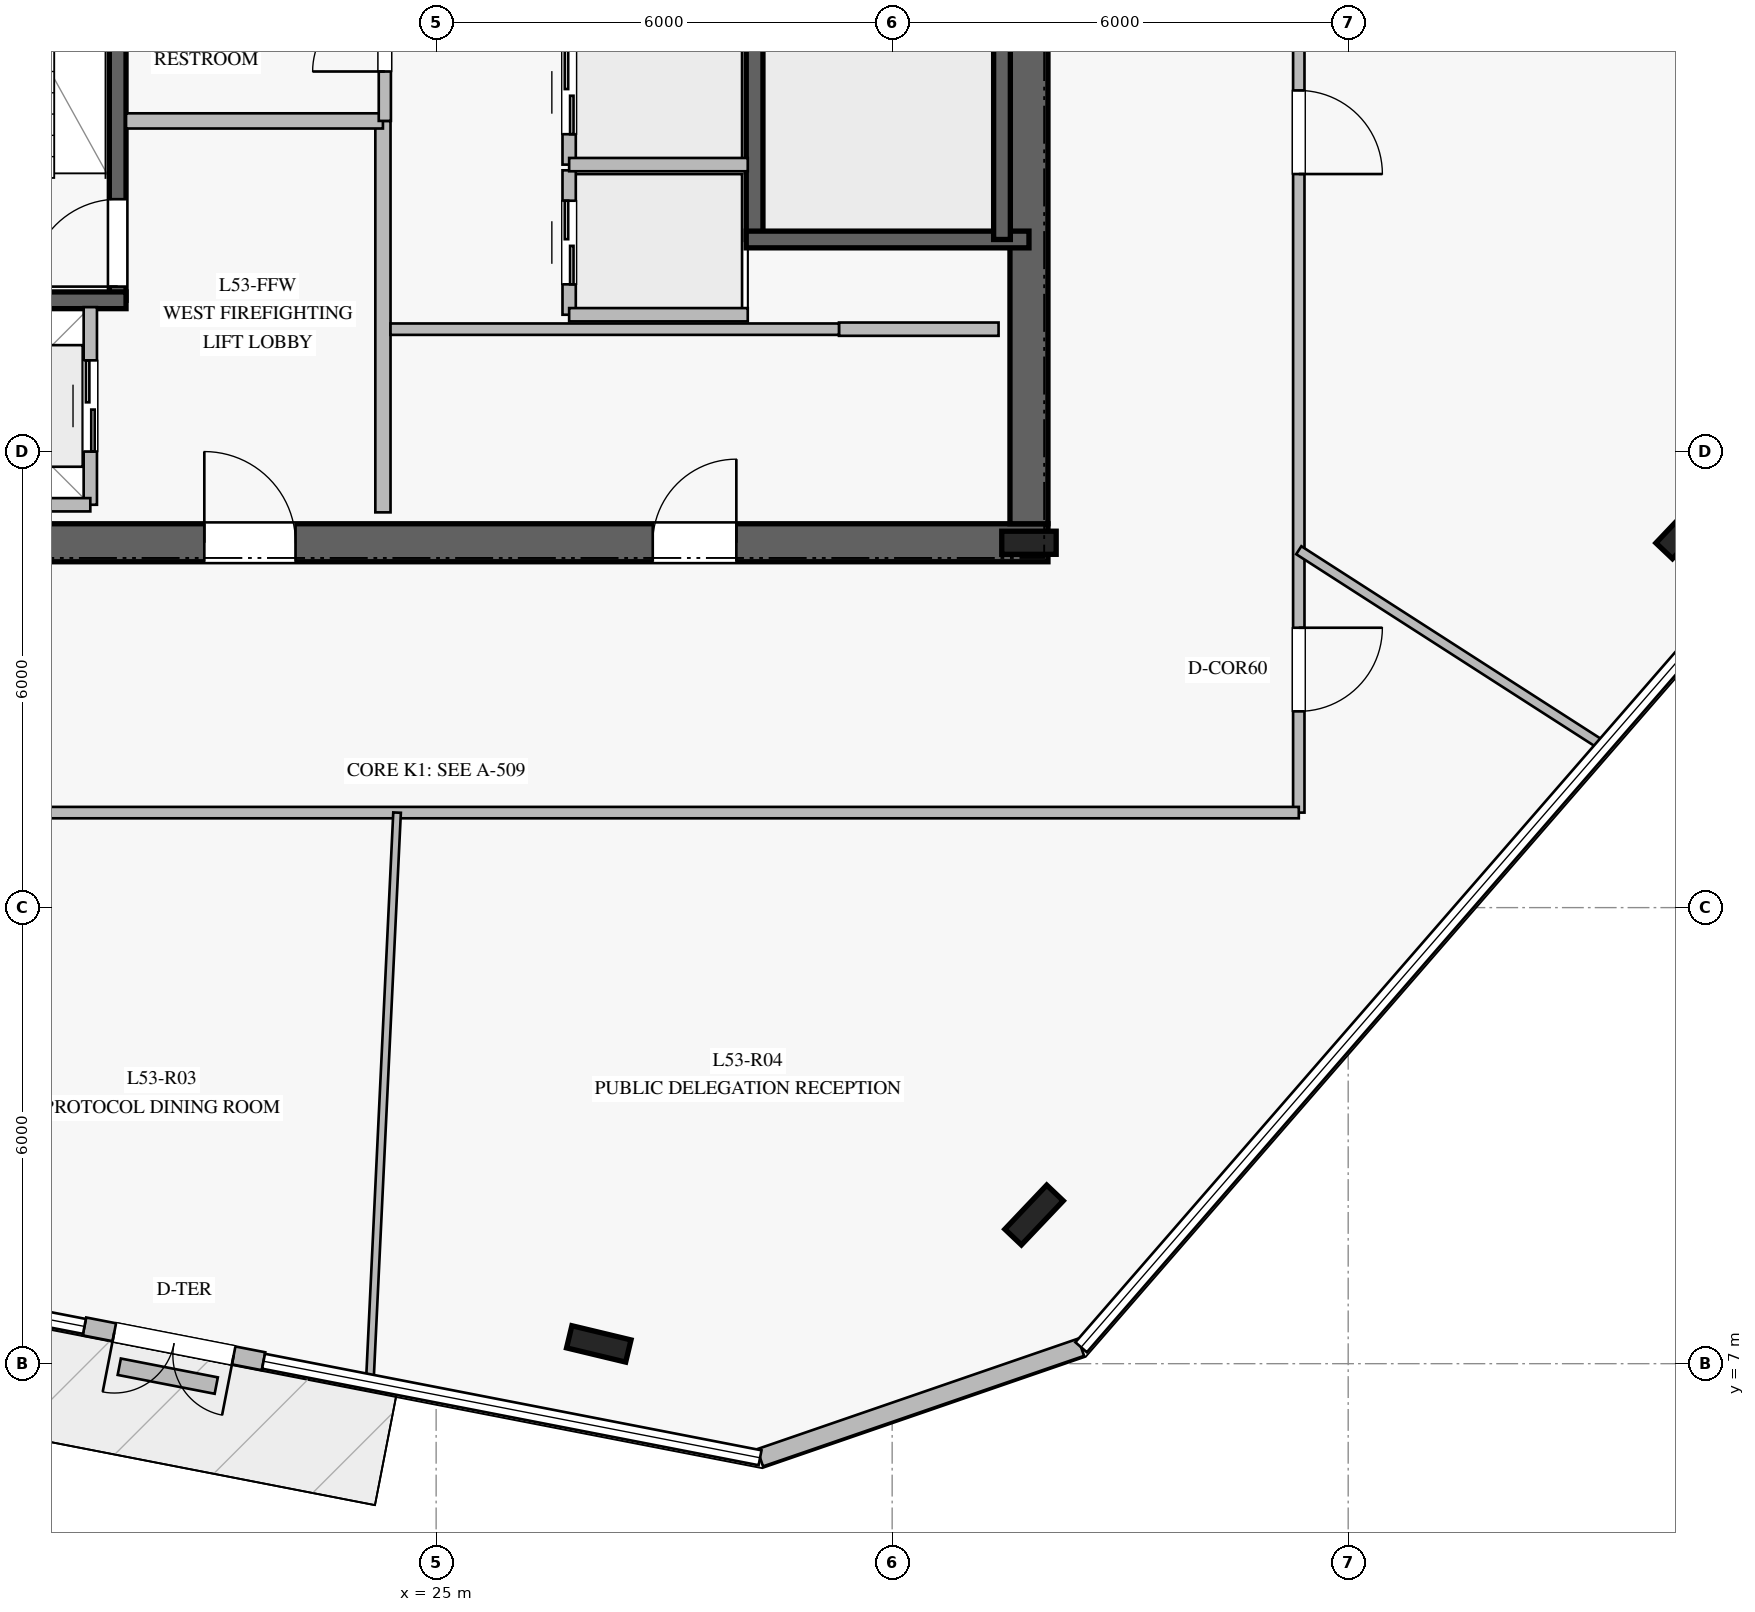
"""IFC4 building model, lengths in metres.
Left out: names, types, materials, properties, quantities, classifications, styles, units other than length and angle.
Written with IfcOpenShell. Run it as: python <this file> out.ifc"""

import sys

from ifc_helpers import new_model, si_unit, direction, frame, frame_2d, origin, origin_2d, place, context, subcontext, project, spatial, rectangle, i_section, extrude, element, fill, save


model = new_model("IFC4")
c1 = context("Model", 3, precision=1e-05, world=origin(), true_north=direction((0.0, 1.0)))
c2 = subcontext(c1, "Body", "Model", "MODEL_VIEW")
j1 = project(units=[si_unit("LENGTHUNIT", "METRE"), si_unit("PLANEANGLEUNIT", "RADIAN")], contexts=[c1])
p1 = place(None, origin())
s1 = spatial("IfcSite", under=j1, at=p1, CompositionType="ELEMENT")
p2 = place(p1, origin())
s2 = spatial("IfcBuilding", under=s1, at=p2, CompositionType="ELEMENT")
p3 = place(p2, frame((0.0, 0.0, 220.8)))
s3 = spatial("IfcBuildingStorey", under=s2, at=p3, CompositionType="ELEMENT", Elevation=220.8)
p4 = place(p3, frame((16.95, 17.8, 0.0), z_axis=(0.0, 0.0, 1.0), x_axis=(1.0, 0.0, 0.0)))
e1 = element("IfcWall", 1, at=p4, inside=s3, PredefinedType="SHEAR", context=c2, shape_type="SweptSolid", body=[
    extrude(rectangle(XDim=16.1, YDim=0.5, at=frame_2d((8.05, 0.0))), origin(), (0.0, 0.0, 1.0), 3.78),
])
p5 = place(p4, frame((5.0, 0.0, 0.0)))
e2 = element("IfcOpeningElement", 2, at=p5, cuts=e1, PredefinedType="OPENING", context=c2, shape_type="SweptSolid", body=[
    extrude(rectangle(XDim=1.2, YDim=2.25, at=frame_2d((0.6, 1.125))), frame((0.0, 0.26, 0.0), z_axis=(0.0, -1.0, 0.0), x_axis=(1.0, 0.0, 0.0)), (0.0, 0.0, 1.0), 0.52),
])
p6 = place(p4, frame((10.9, 0.0, 0.0)))
e3 = element("IfcOpeningElement", 3, at=p6, cuts=e1, PredefinedType="OPENING", context=c2, shape_type="SweptSolid", body=[
    extrude(rectangle(XDim=1.1, YDim=2.2, at=frame_2d((0.55, 1.1))), frame((0.0, 0.26, 0.0), z_axis=(0.0, -1.0, 0.0), x_axis=(1.0, 0.0, 0.0)), (0.0, 0.0, 1.0), 0.52),
])
p7 = place(p3, frame((32.8, 18.05, 0.0), z_axis=(0.0, 0.0, 1.0), x_axis=(0.0, 1.0, 0.0)))
e4 = element("IfcWall", 4, at=p7, inside=s3, PredefinedType="SHEAR", context=c2, shape_type="SweptSolid", body=[
    extrude(rectangle(XDim=13.9, YDim=0.5, at=frame_2d((6.95, 0.0))), origin(), (0.0, 0.0, 1.0), 3.78),
])
p8 = place(p3, frame((32.8, 17.8, 0.0), z_axis=(0.0, 0.0, 1.0), x_axis=(1.0, 0.0, 0.0)))
e5 = element("IfcColumn", 5, at=p8, inside=s3, PredefinedType="COLUMN", context=c2, shape_type="SweptSolid", body=[
    extrude(i_section(OverallWidth=0.304, OverallDepth=0.716, WebThickness=0.021, FlangeThickness=0.04, at=origin_2d()), origin(), (0.0, 0.0, 1.0), 4.0),
])
p9 = place(p3, frame((20.81, 20.99, 0.0), z_axis=(0.0, 0.0, 1.0), x_axis=(0.0, 1.0, 0.0)))
e6 = element("IfcWall", 6, at=p9, inside=s3, PredefinedType="SOLIDWALL", context=c2, shape_type="SweptSolid", body=[
    extrude(rectangle(XDim=7.22, YDim=0.22, at=frame_2d((3.61, 0.0))), origin(), (0.0, 0.0, 1.0), 3.78),
])
p10 = place(p9, frame((0.18, 0.0, 0.0)))
e7 = element("IfcOpeningElement", 7, at=p10, cuts=e6, PredefinedType="OPENING", context=c2, shape_type="SweptSolid", body=[
    extrude(rectangle(XDim=1.15, YDim=2.2, at=frame_2d((0.575, 1.1))), frame((0.0, 0.12, 0.0), z_axis=(0.0, -1.0, 0.0), x_axis=(1.0, 0.0, 0.0)), (0.0, 0.0, 1.0), 0.24),
])
p11 = place(p3, frame((17.2, 20.99, 0.0), z_axis=(0.0, 0.0, 1.0), x_axis=(1.0, 0.0, 0.0)))
e8 = element("IfcWall", 8, at=p11, inside=s3, PredefinedType="SOLIDWALL", context=c2, shape_type="SweptSolid", body=[
    extrude(rectangle(XDim=3.72, YDim=0.22, at=frame_2d((1.86, 0.0))), origin(), (0.0, 0.0, 1.0), 3.78),
])
p12 = place(p3, frame((29.19, 21.79, 0.0), z_axis=(0.0, 0.0, 1.0), x_axis=(0.0, 1.0, 0.0)))
e9 = element("IfcWall", 9, at=p12, inside=s3, PredefinedType="SOLIDWALL", context=c2, shape_type="SweptSolid", body=[
    extrude(rectangle(XDim=7.22, YDim=0.22, at=frame_2d((3.61, 0.0))), origin(), (0.0, 0.0, 1.0), 3.78),
])
p13 = place(p12, frame((5.88, 0.0, 0.0)))
e10 = element("IfcOpeningElement", 10, at=p13, cuts=e9, PredefinedType="OPENING", context=c2, shape_type="SweptSolid", body=[
    extrude(rectangle(XDim=1.15, YDim=2.2, at=frame_2d((0.575, 1.1))), frame((0.0, 0.12, 0.0), z_axis=(0.0, -1.0, 0.0), x_axis=(1.0, 0.0, 0.0)), (0.0, 0.0, 1.0), 0.24),
])
p14 = place(p3, frame((29.08, 21.79, 0.0), z_axis=(0.0, 0.0, 1.0), x_axis=(1.0, 0.0, 0.0)))
e11 = element("IfcWall", 11, at=p14, inside=s3, PredefinedType="SOLIDWALL", context=c2, shape_type="SweptSolid", body=[
    extrude(rectangle(XDim=3.72, YDim=0.22, at=frame_2d((1.86, 0.0))), origin(), (0.0, 0.0, 1.0), 3.78),
])
p15 = place(p3, frame((32.445, 29.01, 0.0), z_axis=(0.0, 0.0, 1.0), x_axis=(0.0, -1.0, 0.0)))
e12 = element("IfcWall", 12, at=p15, inside=s3, PredefinedType="SOLIDWALL", context=c2, shape_type="SweptSolid", body=[
    extrude(rectangle(XDim=7.22, YDim=0.22, at=frame_2d((3.61, 0.0))), origin(), (0.0, 0.0, 1.0), 3.78),
])
for number, where, z_axis, x_axis in (
    (13, (27.14, 7.26, 0.0), (0.0, 0.0, 1.0), (-0.972, 0.233, 0.0)),
    (14, (32.867, 8.956, 0.0), (0.0, 0.0, 1.0), (0.688, 0.725, 0.0)),
    (15, (41.433, 17.984, 0.0), (0.0, 0.0, 1.0), (0.688, 0.725, 0.0)),
):
    element("IfcColumn", number, at=place(p3, frame(where, z_axis=z_axis, x_axis=x_axis)), inside=s3, PredefinedType="COLUMN", context=c2, shape_type="SweptSolid", body=[
        extrude(i_section(OverallWidth=0.3, OverallDepth=0.8, WebThickness=0.018, FlangeThickness=0.033, at=origin_2d()), origin(), (0.0, 0.0, 1.0), 4.0),
    ])
p16 = place(p3, frame((20.373, 7.49, 0.0), z_axis=(0.0, 0.0, 1.0), x_axis=(0.981622800685, -0.190831541356, 0.0)))
e16 = element("IfcWall", 16, at=p16, inside=s3, PredefinedType="STANDARD", context=c2, shape_type="SweptSolid", body=[
    extrude(rectangle(XDim=2.4, YDim=0.24, at=frame_2d((1.2, 0.0))), origin(), (0.0, 0.0, 1.0), 3.78),
])
p17 = place(p16, frame((0.4, 0.0, 0.0)))
e17 = element("IfcOpeningElement", 17, at=p17, cuts=e16, PredefinedType="OPENING", context=c2, shape_type="SweptSolid", body=[
    extrude(rectangle(XDim=1.6, YDim=2.25, at=frame_2d((0.8, 1.125))), frame((0.0, 0.13, 0.0), z_axis=(0.0, -1.0, 0.0), x_axis=(1.0, 0.0, 0.0)), (0.0, 0.0, 1.0), 0.26),
])
p18 = place(p3, frame((29.262, 5.762, 0.0), z_axis=(0.0, 0.0, 1.0), x_axis=(0.94554475493, 0.325492114227, 0.0)))
e18 = element("IfcWall", 18, at=p18, inside=s3, PredefinedType="STANDARD", context=c2, shape_type="SweptSolid", body=[
    extrude(rectangle(XDim=4.467, YDim=0.24, at=frame_2d((2.234, 0.0))), origin(), (0.0, 0.0, 1.0), 3.78),
])
p19 = place(p3, frame((20.831, 6.96, 0.0), z_axis=(0.0, 0.0, 1.0), x_axis=(0.981621254658, -0.190839493826, 0.0)))
e19 = element("IfcWall", 19, at=p19, inside=s3, PredefinedType="USERDEFINED", context=c2, shape_type="SweptSolid", body=[
    extrude(rectangle(XDim=1.3, YDim=0.22, at=frame_2d((0.65, 0.0))), origin(), (0.0, 0.0, 1.0), 0.4),
])
p20 = place(p3, frame((24.3, 18.2, 0.0), z_axis=(0.0, 0.0, 1.0), x_axis=(0.0, 1.0, 0.0)))
e20 = element("IfcWall", 20, at=p20, inside=s3, PredefinedType="PARTITIONING", context=c2, shape_type="SweptSolid", body=[
    extrude(rectangle(XDim=5.15, YDim=0.2, at=frame_2d((2.575, 0.0))), origin(), (0.0, 0.0, 1.0), 3.78),
])
p21 = place(p3, frame((20.92, 23.35, 0.0), z_axis=(0.0, 0.0, 1.0), x_axis=(1.0, 0.0, 0.0)))
e21 = element("IfcWall", 21, at=p21, inside=s3, PredefinedType="PARTITIONING", context=c2, shape_type="SweptSolid", body=[
    extrude(rectangle(XDim=3.38, YDim=0.2, at=frame_2d((1.69, 0.0))), origin(), (0.0, 0.0, 1.0), 3.78),
])
p22 = place(p3, frame((24.325, 23.35, 0.0), z_axis=(0.0, 0.0, 1.0), x_axis=(0.0, 1.0, 0.0)))
e22 = element("IfcWall", 22, at=p22, inside=s3, PredefinedType="PLUMBINGWALL", context=c2, shape_type="SweptSolid", body=[
    extrude(rectangle(XDim=4.93, YDim=0.16, at=frame_2d((2.465, 0.0))), origin(), (0.0, 0.0, 1.0), 3.78),
])
p23 = place(p22, frame((0.65, 0.0, 0.0)))
e23 = element("IfcOpeningElement", 23, at=p23, cuts=e22, PredefinedType="OPENING", context=c2, shape_type="SweptSolid", body=[
    extrude(rectangle(XDim=0.95, YDim=2.1, at=frame_2d((0.475, 1.05))), frame((0.0, 0.09, 0.0), z_axis=(0.0, -1.0, 0.0), x_axis=(1.0, 0.0, 0.0)), (0.0, 0.0, 1.0), 0.18),
])
p24 = place(p22, frame((3.11, 0.0, 0.0)))
e24 = element("IfcOpeningElement", 24, at=p24, cuts=e22, PredefinedType="OPENING", context=c2, shape_type="SweptSolid", body=[
    extrude(rectangle(XDim=0.9, YDim=2.1, at=frame_2d((0.45, 1.05))), frame((0.0, 0.09, 0.0), z_axis=(0.0, -1.0, 0.0), x_axis=(1.0, 0.0, 0.0)), (0.0, 0.0, 1.0), 0.18),
])
p25 = place(p3, frame((30.3, 20.61, 0.0), z_axis=(0.0, 0.0, 1.0), x_axis=(1.0, 0.0, 0.0)))
e25 = element("IfcWall", 25, at=p25, inside=s3, PredefinedType="PARTITIONING", context=c2, shape_type="SweptSolid", body=[
    extrude(rectangle(XDim=2.1, YDim=0.175, at=frame_2d((1.05, 0.0))), origin(), (0.0, 0.0, 1.0), 3.78),
])
p26 = place(p3, frame((24.4, 20.61, 0.0), z_axis=(0.0, 0.0, 1.0), x_axis=(1.0, 0.0, 0.0)))
e26 = element("IfcWall", 26, at=p26, inside=s3, PredefinedType="PARTITIONING", context=c2, shape_type="SweptSolid", body=[
    extrude(rectangle(XDim=5.9, YDim=0.15, at=frame_2d((2.95, 0.0))), origin(), (0.0, 0.0, 1.0), 3.78),
])
p27 = place(p3, frame((26.75, 20.8, 0.0), z_axis=(0.0, 0.0, 1.0), x_axis=(0.0, 1.0, 0.0)))
e27 = element("IfcWall", 27, at=p27, inside=s3, PredefinedType="PARTITIONING", context=c2, shape_type="SweptSolid", body=[
    extrude(rectangle(XDim=1.9, YDim=0.175, at=frame_2d((0.95, 0.0))), origin(), (0.0, 0.0, 1.0), 3.78),
])
p28 = place(p27, frame((0.4, 0.0, 0.0)))
e28 = element("IfcOpeningElement", 28, at=p28, cuts=e27, PredefinedType="OPENING", context=c2, shape_type="SweptSolid", body=[
    extrude(rectangle(XDim=1.1, YDim=2.2, at=frame_2d((0.55, 1.1))), frame((0.0, 0.098, 0.0), z_axis=(0.0, -1.0, 0.0), x_axis=(1.0, 0.0, 0.0)), (0.0, 0.0, 1.0), 0.195),
])
p29 = place(p3, frame((26.75, 20.8, 0.0), z_axis=(0.0, 0.0, 1.0), x_axis=(1.0, 0.0, 0.0)))
e29 = element("IfcWall", 29, at=p29, inside=s3, PredefinedType="PARTITIONING", context=c2, shape_type="SweptSolid", body=[
    extrude(rectangle(XDim=2.35, YDim=0.175, at=frame_2d((1.175, 0.0))), origin(), (0.0, 0.0, 1.0), 3.78),
])
p30 = place(p3, frame((26.75, 22.775, 0.0), z_axis=(0.0, 0.0, 1.0), x_axis=(0.0, 1.0, 0.0)))
e30 = element("IfcWall", 30, at=p30, inside=s3, PredefinedType="PARTITIONING", context=c2, shape_type="SweptSolid", body=[
    extrude(rectangle(XDim=1.9, YDim=0.175, at=frame_2d((0.95, 0.0))), origin(), (0.0, 0.0, 1.0), 3.78),
])
p31 = place(p30, frame((0.4, 0.0, 0.0)))
e31 = element("IfcOpeningElement", 31, at=p31, cuts=e30, PredefinedType="OPENING", context=c2, shape_type="SweptSolid", body=[
    extrude(rectangle(XDim=1.1, YDim=2.2, at=frame_2d((0.55, 1.1))), frame((0.0, 0.098, 0.0), z_axis=(0.0, -1.0, 0.0), x_axis=(1.0, 0.0, 0.0)), (0.0, 0.0, 1.0), 0.195),
])
p32 = place(p3, frame((26.75, 22.775, 0.0), z_axis=(0.0, 0.0, 1.0), x_axis=(1.0, 0.0, 0.0)))
e32 = element("IfcWall", 32, at=p32, inside=s3, PredefinedType="PARTITIONING", context=c2, shape_type="SweptSolid", body=[
    extrude(rectangle(XDim=2.35, YDim=0.175, at=frame_2d((1.175, 0.0))), origin(), (0.0, 0.0, 1.0), 3.78),
])
p33 = place(p3, frame((20.45, 18.3, 0.0), z_axis=(0.0, 0.0, 1.0), x_axis=(0.0, 1.0, 0.0)))
e33 = element("IfcWall", 33, at=p33, inside=s3, PredefinedType="PARTITIONING", context=c2, shape_type="SweptSolid", body=[
    extrude(rectangle(XDim=2.6, YDim=0.175, at=frame_2d((1.3, 0.0))), origin(), (0.0, 0.0, 1.0), 3.78),
])
p34 = place(p33, frame((0.7, 0.0, 0.0)))
e34 = element("IfcOpeningElement", 34, at=p34, cuts=e33, PredefinedType="OPENING", context=c2, shape_type="SweptSolid", body=[
    extrude(rectangle(XDim=1.2, YDim=2.2, at=frame_2d((0.6, 1.1))), frame((0.0, 0.098, 0.0), z_axis=(0.0, -1.0, 0.0), x_axis=(1.0, 0.0, 0.0)), (0.0, 0.0, 1.0), 0.195),
])
p35 = place(p3, frame((17.85, 18.3, 0.0), z_axis=(0.0, 0.0, 1.0), x_axis=(1.0, 0.0, 0.0)))
e35 = element("IfcWall", 35, at=p35, inside=s3, PredefinedType="PARTITIONING", context=c2, shape_type="SweptSolid", body=[
    extrude(rectangle(XDim=2.6, YDim=0.175, at=frame_2d((1.3, 0.0))), origin(), (0.0, 0.0, 1.0), 3.78),
])
p36 = place(p3, frame((36.35, 35.75, 0.0), z_axis=(0.0, 0.0, 1.0), x_axis=(0.0, -1.0, 0.0)))
e36 = element("IfcWall", 36, at=p36, inside=s3, PredefinedType="PARTITIONING", context=c2, shape_type="SweptSolid", body=[
    extrude(rectangle(XDim=21.5, YDim=0.15, at=frame_2d((10.75, 0.0))), origin(), (0.0, 0.0, 1.0), 3.05),
])
p37 = place(p36, frame((19.068, 0.0, 0.0)))
e37 = element("IfcOpeningElement", 37, at=p37, cuts=e36, PredefinedType="OPENING", context=c2, shape_type="SweptSolid", body=[
    extrude(rectangle(XDim=1.1, YDim=2.2, at=frame_2d((0.55, 1.1))), frame((0.0, 0.085, 0.0), z_axis=(0.0, -1.0, 0.0), x_axis=(1.0, 0.0, 0.0)), (0.0, 0.0, 1.0), 0.17),
])
p38 = place(p36, frame((11.999, 0.0, 0.0)))
e38 = element("IfcOpeningElement", 38, at=p38, cuts=e36, PredefinedType="OPENING", context=c2, shape_type="SweptSolid", body=[
    extrude(rectangle(XDim=1.1, YDim=2.2, at=frame_2d((0.55, 1.1))), frame((0.0, 0.085, 0.0), z_axis=(0.0, -1.0, 0.0), x_axis=(1.0, 0.0, 0.0)), (0.0, 0.0, 1.0), 0.17),
])
p39 = place(p3, frame((36.35, 14.25, 0.0), z_axis=(0.0, 0.0, 1.0), x_axis=(-1.0, 0.0, 0.0)))
e39 = element("IfcWall", 39, at=p39, inside=s3, PredefinedType="PARTITIONING", context=c2, shape_type="SweptSolid", body=[
    extrude(rectangle(XDim=22.7, YDim=0.15, at=frame_2d((11.35, 0.0))), origin(), (0.0, 0.0, 1.0), 3.28),
])
p40 = place(p39, frame((16.461, 0.0, 0.0)))
e40 = element("IfcOpeningElement", 40, at=p40, cuts=e39, PredefinedType="OPENING", context=c2, shape_type="SweptSolid", body=[
    extrude(rectangle(XDim=1.1, YDim=2.2, at=frame_2d((0.55, 1.1))), frame((0.0, 0.085, 0.0), z_axis=(0.0, -1.0, 0.0), x_axis=(1.0, 0.0, 0.0)), (0.0, 0.0, 1.0), 0.17),
])
p41 = place(p3, frame((24.486, 14.25, 0.0), z_axis=(0.0, 0.0, 1.0), x_axis=(-0.047872130545, -0.998853472296, 0.0)))
e41 = element("IfcWall", 41, at=p41, inside=s3, PredefinedType="MOVABLE", context=c2, shape_type="SweptSolid", body=[
    extrude(rectangle(XDim=7.481, YDim=0.1, at=frame_2d((3.741, 0.0))), origin(), (0.0, 0.0, 1.0), 3.18),
])
p42 = place(p3, frame((36.35, 17.702, 0.0), z_axis=(0.0, 0.0, 1.0), x_axis=(0.841170126026, -0.540770578972, 0.0)))
e42 = element("IfcWall", 42, at=p42, inside=s3, PredefinedType="PARTITIONING", context=c2, shape_type="SweptSolid", body=[
    extrude(rectangle(XDim=4.75, YDim=0.125, at=frame_2d((2.375, 0.0))), origin(), (0.0, 0.0, 1.0), 3.18),
])
p43 = place(p17, frame((1.6, 0.0, 0.0), z_axis=(0.0, 0.0, 1.0), x_axis=(-1.0, 0.0, 0.0)))
e43 = element("IfcDoor", 43, at=p43, inside=s3, OperationType="DOUBLE_DOOR_SINGLE_SWING", PredefinedType="DOOR", context=c2, shape_type="SweptSolid", body=[
    extrude(rectangle(XDim=1.6, YDim=2.25, at=frame_2d((0.8, 1.125))), frame((0.0, 0.025, 0.0), z_axis=(0.0, -1.0, 0.0), x_axis=(1.0, 0.0, 0.0)), (0.0, 0.0, 1.0), 0.05),
])
fill(e17, e43)
p44 = place(p10, origin())
e44 = element("IfcDoor", 44, at=p44, inside=s3, OperationType="SINGLE_SWING_LEFT", PredefinedType="DOOR", context=c2, shape_type="SweptSolid", body=[
    extrude(rectangle(XDim=1.15, YDim=2.2, at=frame_2d((0.575, 1.1))), frame((0.0, 0.025, 0.0), z_axis=(0.0, -1.0, 0.0), x_axis=(1.0, 0.0, 0.0)), (0.0, 0.0, 1.0), 0.05),
])
fill(e7, e44)
p45 = place(p5, origin())
e45 = element("IfcDoor", 45, at=p45, inside=s3, OperationType="SINGLE_SWING_LEFT", PredefinedType="DOOR", context=c2, shape_type="SweptSolid", body=[
    extrude(rectangle(XDim=1.2, YDim=2.25, at=frame_2d((0.6, 1.125))), frame((0.0, 0.025, 0.0), z_axis=(0.0, -1.0, 0.0), x_axis=(1.0, 0.0, 0.0)), (0.0, 0.0, 1.0), 0.05),
])
fill(e2, e45)
p46 = place(p23, origin())
e46 = element("IfcDoor", 46, at=p46, inside=s3, OperationType="SINGLE_SWING_LEFT", PredefinedType="DOOR", context=c2, shape_type="SweptSolid", body=[
    extrude(rectangle(XDim=0.95, YDim=2.1, at=frame_2d((0.475, 1.05))), frame((0.0, 0.025, 0.0), z_axis=(0.0, -1.0, 0.0), x_axis=(1.0, 0.0, 0.0)), (0.0, 0.0, 1.0), 0.05),
])
fill(e23, e46)
p47 = place(p6, origin())
e47 = element("IfcDoor", 47, at=p47, inside=s3, OperationType="SINGLE_SWING_RIGHT", PredefinedType="DOOR", context=c2, shape_type="SweptSolid", body=[
    extrude(rectangle(XDim=1.1, YDim=2.2, at=frame_2d((0.55, 1.1))), frame((0.0, 0.025, 0.0), z_axis=(0.0, -1.0, 0.0), x_axis=(1.0, 0.0, 0.0)), (0.0, 0.0, 1.0), 0.05),
])
fill(e3, e47)
p48 = place(p28, origin())
e48 = element("IfcDoor", 48, at=p48, inside=s3, OperationType="DOUBLE_DOOR_SLIDING", PredefinedType="DOOR", context=c2, shape_type="SweptSolid", body=[
    extrude(rectangle(XDim=1.1, YDim=2.2, at=frame_2d((0.55, 1.1))), frame((0.0, 0.025, 0.0), z_axis=(0.0, -1.0, 0.0), x_axis=(1.0, 0.0, 0.0)), (0.0, 0.0, 1.0), 0.05),
])
fill(e28, e48)
p49 = place(p31, origin())
e49 = element("IfcDoor", 49, at=p49, inside=s3, OperationType="DOUBLE_DOOR_SLIDING", PredefinedType="DOOR", context=c2, shape_type="SweptSolid", body=[
    extrude(rectangle(XDim=1.1, YDim=2.2, at=frame_2d((0.55, 1.1))), frame((0.0, 0.025, 0.0), z_axis=(0.0, -1.0, 0.0), x_axis=(1.0, 0.0, 0.0)), (0.0, 0.0, 1.0), 0.05),
])
fill(e31, e49)
p50 = place(p34, origin())
e50 = element("IfcDoor", 50, at=p50, inside=s3, OperationType="DOUBLE_DOOR_SLIDING", PredefinedType="DOOR", context=c2, shape_type="SweptSolid", body=[
    extrude(rectangle(XDim=1.2, YDim=2.2, at=frame_2d((0.6, 1.1))), frame((0.0, 0.025, 0.0), z_axis=(0.0, -1.0, 0.0), x_axis=(1.0, 0.0, 0.0)), (0.0, 0.0, 1.0), 0.05),
])
fill(e34, e50)
p51 = place(p37, origin())
e51 = element("IfcDoor", 51, at=p51, inside=s3, OperationType="SINGLE_SWING_LEFT", PredefinedType="DOOR", context=c2, shape_type="SweptSolid", body=[
    extrude(rectangle(XDim=1.1, YDim=2.2, at=frame_2d((0.55, 1.1))), frame((0.0, 0.025, 0.0), z_axis=(0.0, -1.0, 0.0), x_axis=(1.0, 0.0, 0.0)), (0.0, 0.0, 1.0), 0.05),
])
fill(e37, e51)
p52 = place(p38, origin())
e52 = element("IfcDoor", 52, at=p52, inside=s3, OperationType="SINGLE_SWING_RIGHT", PredefinedType="DOOR", context=c2, shape_type="SweptSolid", body=[
    extrude(rectangle(XDim=1.1, YDim=2.2, at=frame_2d((0.55, 1.1))), frame((0.0, 0.025, 0.0), z_axis=(0.0, -1.0, 0.0), x_axis=(1.0, 0.0, 0.0)), (0.0, 0.0, 1.0), 0.05),
])
fill(e38, e52)
save(model, sys.argv[1])
